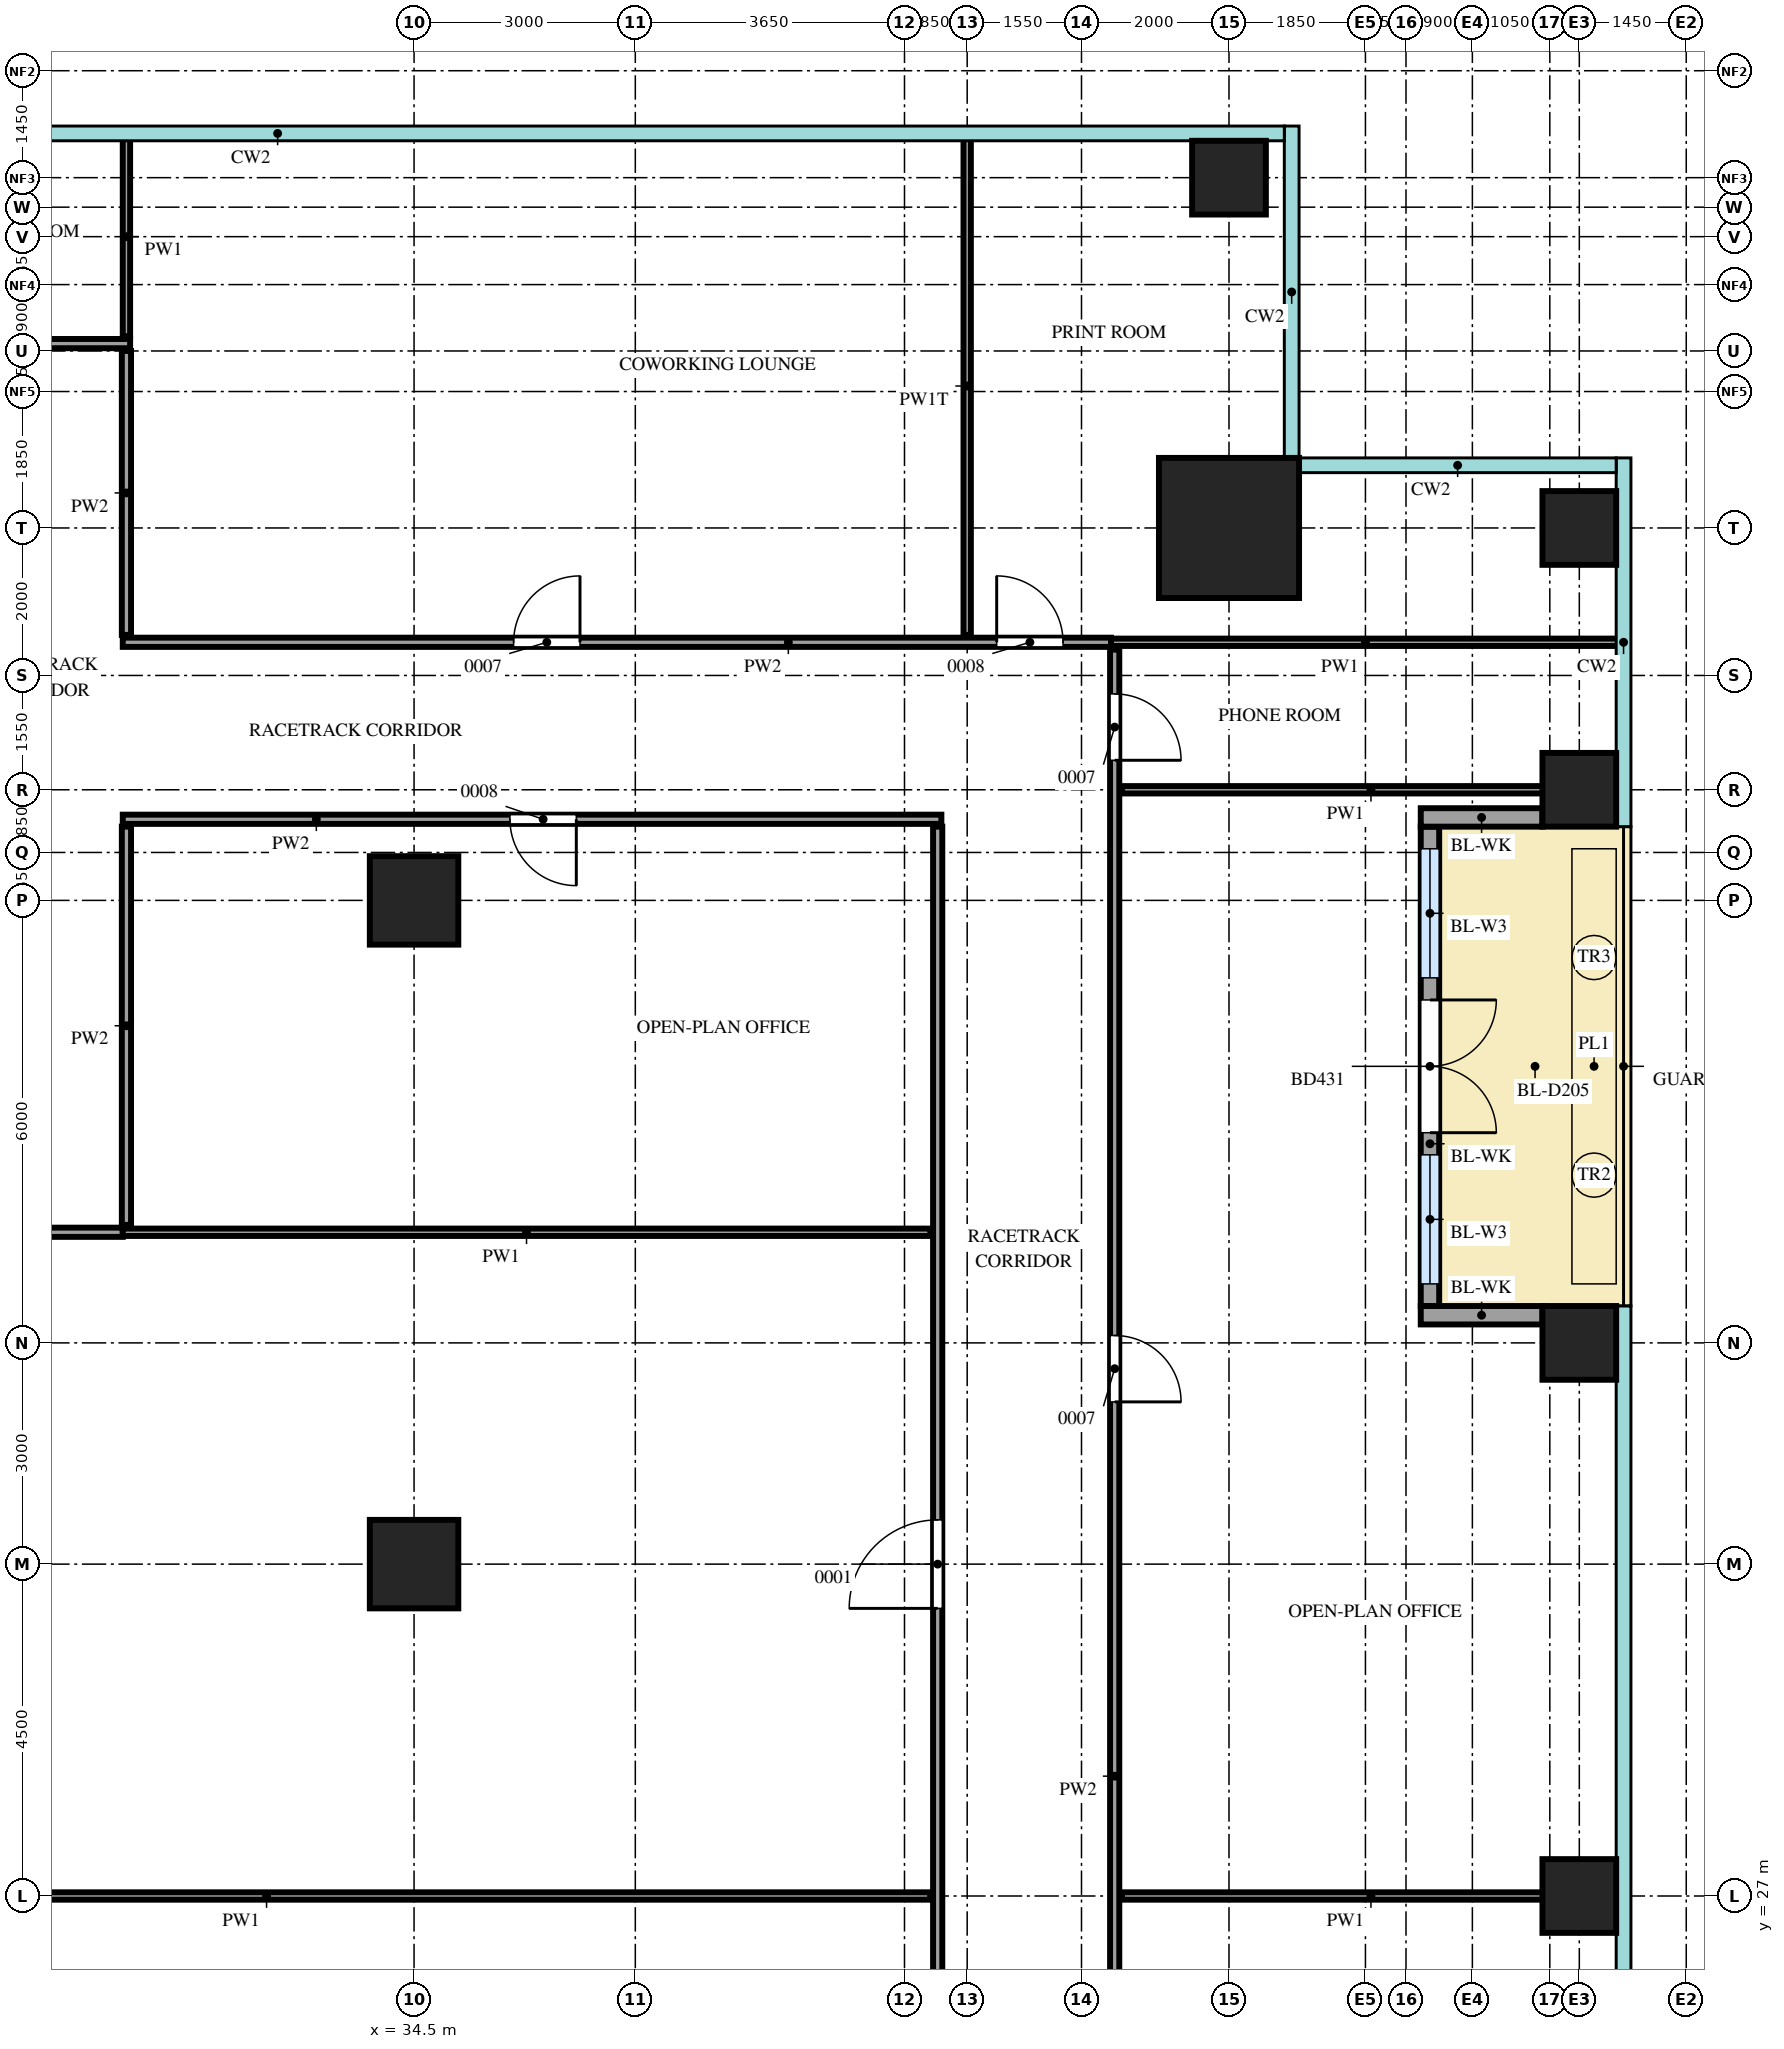
"""IFC4 building model, lengths in metres.
Left out: names, types, materials, properties, quantities, classifications, styles, units other than length and angle.
Written with IfcOpenShell. Run it as: python <this file> out.ifc"""

import sys

from ifc_helpers import new_model, si_unit, direction, frame, frame_2d, origin, origin_2d, place, context, subcontext, project, spatial, rectangle, extrude, source, transform, mapped, element, fill, save


model = new_model("IFC4")
c1 = context("Model", 3, precision=1e-05, world=origin(), true_north=direction((0.0, 1.0)))
c2 = subcontext(c1, "Body", "Model", "MODEL_VIEW")
j1 = project(units=[si_unit("LENGTHUNIT", "METRE"), si_unit("PLANEANGLEUNIT", "RADIAN")], contexts=[c1])
p1 = place(None, origin())
s1 = spatial("IfcSite", under=j1, at=p1, CompositionType="ELEMENT")
p2 = place(p1, origin())
s2 = spatial("IfcBuilding", under=s1, at=p2, CompositionType="ELEMENT")
p3 = place(p2, frame((0.0, 0.0, 196.7)))
s3 = spatial("IfcBuildingStorey", under=s2, at=p3, CompositionType="ELEMENT", Elevation=196.7)
m1 = source(origin(), c2, "Body", "SweptSolid", [
    extrude(rectangle(XDim=1.9, YDim=1.9, at=origin_2d()), origin(), (0.0, 0.0, 1.0), 4.0),
])
p4 = place(p3, frame((45.55, 45.55, 0.0), z_axis=(0.0, 0.0, 1.0), x_axis=(1.0, 0.0, 0.0)))
e1 = element("IfcColumn", 1, at=p4, inside=s3, PredefinedType="COLUMN", context=c2, shape_type="MappedRepresentation", body=[
    mapped(m1, transform((0.0, 0.0, 0.0))),
])
m2 = source(origin(), c2, "Body", "SweptSolid", [
    extrude(rectangle(XDim=1.0, YDim=1.0, at=origin_2d()), origin(), (0.0, 0.0, 1.0), 3.75),
])
for number, where, z_axis, x_axis in (
    (2, (50.3, 27.0, 0.0), (0.0, 0.0, 1.0), (1.0, 0.0, 0.0)),
    (3, (50.3, 34.5, 0.0), (0.0, 0.0, 1.0), (1.0, 0.0, 0.0)),
    (4, (50.3, 42.0, 0.0), (0.0, 0.0, 1.0), (1.0, 0.0, 0.0)),
    (5, (50.3, 45.55, 0.0), (0.0, 0.0, 1.0), (1.0, 0.0, 0.0)),
    (6, (45.55, 50.3, 0.0), (0.0, 0.0, 1.0), (1.0, 0.0, 0.0)),
):
    element("IfcColumn", number, at=place(p3, frame(where, z_axis=z_axis, x_axis=x_axis)), inside=s3, PredefinedType="COLUMN", context=c2, shape_type="MappedRepresentation", body=[
        mapped(m2, transform((0.0, 0.0, 0.0))),
    ])
m3 = source(origin(), c2, "Body", "SweptSolid", [
    extrude(rectangle(XDim=1.2, YDim=1.2, at=origin_2d()), origin(), (0.0, 0.0, 1.0), 3.75),
])
for number, where, z_axis, x_axis in (
    (7, (34.5, 31.5, 0.0), (0.0, 0.0, 1.0), (1.0, 0.0, 0.0)),
    (8, (34.5, 40.5, 0.0), (0.0, 0.0, 1.0), (1.0, 0.0, 0.0)),
):
    element("IfcColumn", number, at=place(p3, frame(where, z_axis=z_axis, x_axis=x_axis)), inside=s3, PredefinedType="COLUMN", context=c2, shape_type="MappedRepresentation", body=[
        mapped(m3, transform((0.0, 0.0, 0.0))),
    ])
m4 = source(origin(), c2, "Body", "SweptSolid", [
    extrude(rectangle(XDim=6.5, YDim=0.25, at=frame_2d((3.25, 0.0))), origin(), (0.0, 0.0, 1.0), 3.15),
])
p5 = place(p3, frame((48.275, 35.0, 0.0), z_axis=(0.0, 0.0, 1.0), x_axis=(0.0, 1.0, 0.0)))
e9 = element("IfcWall", 9, at=p5, inside=s3, PredefinedType="SOLIDWALL", context=c2, shape_type="MappedRepresentation", body=[
    mapped(m4, transform((0.0, 0.0, 0.0))),
])
m5 = source(origin(), c2, "Body", "SweptSolid", [
    extrude(rectangle(XDim=1.75, YDim=2.4, at=frame_2d((0.875, 1.2))), frame((0.0, 0.135, 0.0), z_axis=(0.0, -1.0, 0.0), x_axis=(1.0, 0.0, 0.0)), (0.0, 0.0, 1.0), 0.27),
])
p6 = place(p5, frame((0.3, 0.0, 0.0)))
e10 = element("IfcOpeningElement", 10, at=p6, cuts=e9, PredefinedType="OPENING", context=c2, shape_type="MappedRepresentation", body=[
    mapped(m5, transform((0.0, 0.0, 0.0))),
])
p7 = place(p5, frame((4.45, 0.0, 0.0)))
e11 = element("IfcOpeningElement", 11, at=p7, cuts=e9, PredefinedType="OPENING", context=c2, shape_type="MappedRepresentation", body=[
    mapped(m5, transform((0.0, 0.0, 0.0))),
])
m6 = source(origin(), c2, "Body", "SweptSolid", [
    extrude(rectangle(XDim=1.8, YDim=2.4, at=frame_2d((0.9, 1.2))), frame((0.0, 0.135, 0.0), z_axis=(0.0, -1.0, 0.0), x_axis=(1.0, 0.0, 0.0)), (0.0, 0.0, 1.0), 0.27),
])
p8 = place(p5, frame((2.35, 0.0, 0.0)))
e12 = element("IfcOpeningElement", 12, at=p8, cuts=e9, PredefinedType="OPENING", context=c2, shape_type="MappedRepresentation", body=[
    mapped(m6, transform((0.0, 0.0, 0.0))),
])
m7 = source(origin(), c2, "Body", "SweptSolid", [
    extrude(rectangle(XDim=1.65, YDim=0.25, at=frame_2d((0.825, 0.0))), origin(), (0.0, 0.0, 1.0), 3.15),
])
for number, where, z_axis, x_axis in (
    (13, (49.8, 34.875, 0.0), (0.0, 0.0, 1.0), (-1.0, 0.0, 0.0)),
    (14, (49.8, 41.625, 0.0), (0.0, 0.0, 1.0), (-1.0, 0.0, 0.0)),
):
    element("IfcWall", number, at=place(p3, frame(where, z_axis=z_axis, x_axis=x_axis)), inside=s3, PredefinedType="SOLIDWALL", context=c2, shape_type="MappedRepresentation", body=[
        mapped(m7, transform((0.0, 0.0, 0.0))),
    ])
m8 = source(origin(), c2, "Body", "SweptSolid", [
    extrude(rectangle(XDim=33.8, YDim=0.125, at=frame_2d((16.9, 0.0))), origin(), (0.0, 0.0, 1.0), 3.8),
])
p9 = place(p3, frame((44.0, 10.1, 0.0), z_axis=(0.0, 0.0, 1.0), x_axis=(0.0, 1.0, 0.0)))
e15 = element("IfcWall", 15, at=p9, inside=s3, PredefinedType="PARTITIONING", context=c2, shape_type="MappedRepresentation", body=[
    mapped(m8, transform((0.0, 0.0, 0.0))),
])
m9 = source(origin(), c2, "Body", "SweptSolid", [
    extrude(rectangle(XDim=0.9, YDim=2.1, at=frame_2d((0.45, 1.05))), frame((0.0, 0.073, 0.0), z_axis=(0.0, -1.0, 0.0), x_axis=(1.0, 0.0, 0.0)), (0.0, 0.0, 1.0), 0.145),
])
p10 = place(p9, frame((5.25, 0.0, 0.0)))
e16 = element("IfcOpeningElement", 16, at=p10, cuts=e15, PredefinedType="OPENING", context=c2, shape_type="MappedRepresentation", body=[
    mapped(m9, transform((0.0, 0.0, 0.0))),
])
p11 = place(p9, frame((12.55, 0.0, 0.0)))
e17 = element("IfcOpeningElement", 17, at=p11, cuts=e15, PredefinedType="OPENING", context=c2, shape_type="MappedRepresentation", body=[
    mapped(m9, transform((0.0, 0.0, 0.0))),
])
p12 = place(p9, frame((23.6, 0.0, 0.0)))
e18 = element("IfcOpeningElement", 18, at=p12, cuts=e15, PredefinedType="OPENING", context=c2, shape_type="MappedRepresentation", body=[
    mapped(m9, transform((0.0, 0.0, 0.0))),
])
p13 = place(p9, frame((32.3, 0.0, 0.0)))
e19 = element("IfcOpeningElement", 19, at=p13, cuts=e15, PredefinedType="OPENING", context=c2, shape_type="MappedRepresentation", body=[
    mapped(m9, transform((0.0, 0.0, 0.0))),
])
m10 = source(origin(), c2, "Body", "SweptSolid", [
    extrude(rectangle(XDim=29.0, YDim=0.125, at=frame_2d((14.5, 0.0))), origin(), (0.0, 0.0, 1.0), 3.8),
])
p14 = place(p3, frame((41.6, 12.5, 0.0), z_axis=(0.0, 0.0, 1.0), x_axis=(0.0, 1.0, 0.0)))
e20 = element("IfcWall", 20, at=p14, inside=s3, PredefinedType="PARTITIONING", context=c2, shape_type="MappedRepresentation", body=[
    mapped(m10, transform((0.0, 0.0, 0.0))),
])
m11 = source(origin(), c2, "Body", "SweptSolid", [
    extrude(rectangle(XDim=1.2, YDim=2.1, at=frame_2d((0.6, 1.05))), frame((0.0, 0.073, 0.0), z_axis=(0.0, -1.0, 0.0), x_axis=(1.0, 0.0, 0.0)), (0.0, 0.0, 1.0), 0.145),
])
p15 = place(p14, frame((18.4, 0.0, 0.0)))
e21 = element("IfcOpeningElement", 21, at=p15, cuts=e20, PredefinedType="OPENING", context=c2, shape_type="MappedRepresentation", body=[
    mapped(m11, transform((0.0, 0.0, 0.0))),
])
m12 = source(origin(), c2, "Body", "SweptSolid", [
    extrude(rectangle(XDim=18.0, YDim=0.1, at=frame_2d((9.0, 0.0))), origin(), (0.0, 0.0, 1.0), 3.8),
])
p16 = place(p3, frame((23.5, 27.0, 0.0), z_axis=(0.0, 0.0, 1.0), x_axis=(1.0, 0.0, 0.0)))
e22 = element("IfcWall", 22, at=p16, inside=s3, PredefinedType="PARTITIONING", context=c2, shape_type="MappedRepresentation", body=[
    mapped(m12, transform((0.0, 0.0, 0.0))),
])
m13 = source(origin(), c2, "Body", "SweptSolid", [
    extrude(rectangle(XDim=6.75, YDim=0.1, at=frame_2d((3.375, 0.0))), origin(), (0.0, 0.0, 1.0), 3.8),
])
p17 = place(p3, frame((44.1, 27.0, 0.0), z_axis=(0.0, 0.0, 1.0), x_axis=(1.0, 0.0, 0.0)))
e23 = element("IfcWall", 23, at=p17, inside=s3, PredefinedType="PARTITIONING", context=c2, shape_type="MappedRepresentation", body=[
    mapped(m13, transform((0.0, 0.0, 0.0))),
])
m14 = source(origin(), c2, "Body", "SweptSolid", [
    extrude(rectangle(XDim=7.2, YDim=0.125, at=frame_2d((3.6, 0.0))), origin(), (0.0, 0.0, 1.0), 3.8),
])
p18 = place(p3, frame((23.35, 36.0, 0.0), z_axis=(0.0, 0.0, 1.0), x_axis=(1.0, 0.0, 0.0)))
e24 = element("IfcWall", 24, at=p18, inside=s3, PredefinedType="PARTITIONING", context=c2, shape_type="MappedRepresentation", body=[
    mapped(m14, transform((0.0, 0.0, 0.0))),
])
m15 = source(origin(), c2, "Body", "SweptSolid", [
    extrude(rectangle(XDim=10.95, YDim=0.1, at=frame_2d((5.475, 0.0))), origin(), (0.0, 0.0, 1.0), 3.8),
])
p19 = place(p3, frame((30.55, 36.0, 0.0), z_axis=(0.0, 0.0, 1.0), x_axis=(1.0, 0.0, 0.0)))
e25 = element("IfcWall", 25, at=p19, inside=s3, PredefinedType="PARTITIONING", context=c2, shape_type="MappedRepresentation", body=[
    mapped(m15, transform((0.0, 0.0, 0.0))),
])
m16 = source(origin(), c2, "Body", "SweptSolid", [
    extrude(rectangle(XDim=5.4, YDim=0.125, at=frame_2d((2.7, 0.0))), origin(), (0.0, 0.0, 1.0), 3.8),
])
p20 = place(p3, frame((30.6, 36.1, 0.0), z_axis=(0.0, 0.0, 1.0), x_axis=(0.0, 1.0, 0.0)))
e26 = element("IfcWall", 26, at=p20, inside=s3, PredefinedType="PARTITIONING", context=c2, shape_type="MappedRepresentation", body=[
    mapped(m16, transform((0.0, 0.0, 0.0))),
])
m17 = source(origin(), c2, "Body", "SweptSolid", [
    extrude(rectangle(XDim=11.1, YDim=0.125, at=frame_2d((5.55, 0.0))), origin(), (0.0, 0.0, 1.0), 3.8),
])
p21 = place(p3, frame((30.55, 41.6, 0.0), z_axis=(0.0, 0.0, 1.0), x_axis=(1.0, 0.0, 0.0)))
e27 = element("IfcWall", 27, at=p21, inside=s3, PredefinedType="PARTITIONING", context=c2, shape_type="MappedRepresentation", body=[
    mapped(m17, transform((0.0, 0.0, 0.0))),
])
p22 = place(p21, frame((5.25, 0.0, 0.0)))
e28 = element("IfcOpeningElement", 28, at=p22, cuts=e27, PredefinedType="OPENING", context=c2, shape_type="MappedRepresentation", body=[
    mapped(m9, transform((0.0, 0.0, 0.0))),
])
p23 = place(p3, frame((44.1, 42.0, 0.0), z_axis=(0.0, 0.0, 1.0), x_axis=(1.0, 0.0, 0.0)))
e29 = element("IfcWall", 29, at=p23, inside=s3, PredefinedType="PARTITIONING", context=c2, shape_type="MappedRepresentation", body=[
    mapped(m13, transform((0.0, 0.0, 0.0))),
])
m18 = source(origin(), c2, "Body", "SweptSolid", [
    extrude(rectangle(XDim=13.4, YDim=0.125, at=frame_2d((6.7, 0.0))), origin(), (0.0, 0.0, 1.0), 3.8),
])
p24 = place(p3, frame((30.55, 44.0, 0.0), z_axis=(0.0, 0.0, 1.0), x_axis=(1.0, 0.0, 0.0)))
e30 = element("IfcWall", 30, at=p24, inside=s3, PredefinedType="PARTITIONING", context=c2, shape_type="MappedRepresentation", body=[
    mapped(m18, transform((0.0, 0.0, 0.0))),
])
p25 = place(p24, frame((5.3, 0.0, 0.0)))
e31 = element("IfcOpeningElement", 31, at=p25, cuts=e30, PredefinedType="OPENING", context=c2, shape_type="MappedRepresentation", body=[
    mapped(m9, transform((0.0, 0.0, 0.0))),
])
p26 = place(p24, frame((11.85, 0.0, 0.0)))
e32 = element("IfcOpeningElement", 32, at=p26, cuts=e30, PredefinedType="OPENING", context=c2, shape_type="MappedRepresentation", body=[
    mapped(m9, transform((0.0, 0.0, 0.0))),
])
m19 = source(origin(), c2, "Body", "SweptSolid", [
    extrude(rectangle(XDim=6.9, YDim=0.1, at=frame_2d((3.45, 0.0))), origin(), (0.0, 0.0, 1.0), 3.8),
])
p27 = place(p3, frame((43.95, 44.0, 0.0), z_axis=(0.0, 0.0, 1.0), x_axis=(1.0, 0.0, 0.0)))
e33 = element("IfcWall", 33, at=p27, inside=s3, PredefinedType="PARTITIONING", context=c2, shape_type="MappedRepresentation", body=[
    mapped(m19, transform((0.0, 0.0, 0.0))),
])
m20 = source(origin(), c2, "Body", "SweptSolid", [
    extrude(rectangle(XDim=3.85, YDim=0.125, at=frame_2d((1.925, 0.0))), origin(), (0.0, 0.0, 1.0), 3.8),
])
p28 = place(p3, frame((30.6, 44.1, 0.0), z_axis=(0.0, 0.0, 1.0), x_axis=(0.0, 1.0, 0.0)))
e34 = element("IfcWall", 34, at=p28, inside=s3, PredefinedType="PARTITIONING", context=c2, shape_type="MappedRepresentation", body=[
    mapped(m20, transform((0.0, 0.0, 0.0))),
])
m21 = source(origin(), c2, "Body", "SweptSolid", [
    extrude(rectangle(XDim=6.75, YDim=0.1, at=frame_2d((3.375, 0.0))), origin(), (0.0, 0.0, 1.0), 3.3),
])
p29 = place(p3, frame((42.0, 44.1, 0.0), z_axis=(0.0, 0.0, 1.0), x_axis=(0.0, 1.0, 0.0)))
e35 = element("IfcWall", 35, at=p29, inside=s3, PredefinedType="PARTITIONING", context=c2, shape_type="MappedRepresentation", body=[
    mapped(m21, transform((0.0, 0.0, 0.0))),
])
m22 = source(origin(), c2, "Body", "SweptSolid", [
    extrude(rectangle(XDim=2.7, YDim=0.1, at=frame_2d((1.35, 0.0))), origin(), (0.0, 0.0, 1.0), 3.8),
])
p30 = place(p3, frame((30.6, 48.15, 0.0), z_axis=(0.0, 0.0, 1.0), x_axis=(0.0, 1.0, 0.0)))
e36 = element("IfcWall", 36, at=p30, inside=s3, PredefinedType="PARTITIONING", context=c2, shape_type="MappedRepresentation", body=[
    mapped(m22, transform((0.0, 0.0, 0.0))),
])
m23 = source(origin(), c2, "Body", "SweptSolid", [
    extrude(rectangle(XDim=13.9, YDim=0.125, at=frame_2d((6.95, 0.0))), origin(), (0.0, 0.0, 1.0), 3.8),
])
p31 = place(p3, frame((16.75, 48.05, 0.0), z_axis=(0.0, 0.0, 1.0), x_axis=(1.0, 0.0, 0.0)))
e37 = element("IfcWall", 37, at=p31, inside=s3, PredefinedType="PARTITIONING", context=c2, shape_type="MappedRepresentation", body=[
    mapped(m23, transform((0.0, 0.0, 0.0))),
])
p32 = place(p31, frame((7.7, 0.0, 0.0)))
e38 = element("IfcOpeningElement", 38, at=p32, cuts=e37, PredefinedType="OPENING", context=c2, shape_type="MappedRepresentation", body=[
    mapped(m9, transform((0.0, 0.0, 0.0))),
])
m24 = source(origin(), c2, "Body", "SweptSolid", [
    extrude(rectangle(XDim=1.75, YDim=2.4, at=frame_2d((0.875, 1.2))), frame((0.0, 0.03, 0.0), z_axis=(0.0, -1.0, 0.0), x_axis=(1.0, 0.0, 0.0)), (0.0, 0.0, 1.0), 0.06),
])
p33 = place(p6, origin())
e39 = element("IfcWindow", 39, at=p33, inside=s3, PartitioningType="SINGLE_PANEL", PredefinedType="WINDOW", context=c2, shape_type="MappedRepresentation", body=[
    mapped(m24, transform((0.0, 0.0, 0.0))),
])
fill(e10, e39)
p34 = place(p7, origin())
e40 = element("IfcWindow", 40, at=p34, inside=s3, PartitioningType="SINGLE_PANEL", PredefinedType="WINDOW", context=c2, shape_type="MappedRepresentation", body=[
    mapped(m24, transform((0.0, 0.0, 0.0))),
])
fill(e11, e40)
m25 = source(origin(), c2, "Body", "SweptSolid", [
    extrude(rectangle(XDim=1.8, YDim=2.4, at=frame_2d((0.9, 1.2))), frame((0.0, 0.025, 0.0), z_axis=(0.0, -1.0, 0.0), x_axis=(1.0, 0.0, 0.0)), (0.0, 0.0, 1.0), 0.05),
])
p35 = place(p8, origin())
e41 = element("IfcDoor", 41, at=p35, inside=s3, OperationType="DOUBLE_DOOR_DOUBLE_SWING", PredefinedType="DOOR", context=c2, shape_type="MappedRepresentation", body=[
    mapped(m25, transform((0.0, 0.0, 0.0))),
])
fill(e12, e41)
m26 = source(origin(), c2, "Body", "SweptSolid", [
    extrude(rectangle(XDim=0.9, YDim=2.1, at=frame_2d((0.45, 1.05))), frame((0.0, 0.025, 0.0), z_axis=(0.0, -1.0, 0.0), x_axis=(1.0, 0.0, 0.0)), (0.0, 0.0, 1.0), 0.05),
])
p36 = place(p12, origin())
e42 = element("IfcDoor", 42, at=p36, inside=s3, OperationType="SINGLE_SWING_LEFT", PredefinedType="DOOR", context=c2, shape_type="MappedRepresentation", body=[
    mapped(m26, transform((0.0, 0.0, 0.0))),
])
fill(e18, e42)
p37 = place(p13, origin())
e43 = element("IfcDoor", 43, at=p37, inside=s3, OperationType="SINGLE_SWING_LEFT", PredefinedType="DOOR", context=c2, shape_type="MappedRepresentation", body=[
    mapped(m26, transform((0.0, 0.0, 0.0))),
])
fill(e19, e43)
p38 = place(p25, origin())
e44 = element("IfcDoor", 44, at=p38, inside=s3, OperationType="SINGLE_SWING_LEFT", PredefinedType="DOOR", context=c2, shape_type="MappedRepresentation", body=[
    mapped(m26, transform((0.0, 0.0, 0.0))),
])
fill(e31, e44)
p39 = place(p26, origin())
e45 = element("IfcDoor", 45, at=p39, inside=s3, OperationType="SINGLE_SWING_RIGHT", PredefinedType="DOOR", context=c2, shape_type="MappedRepresentation", body=[
    mapped(m26, transform((0.0, 0.0, 0.0))),
])
fill(e32, e45)
m27 = source(origin(), c2, "Body", "SweptSolid", [
    extrude(rectangle(XDim=1.2, YDim=2.1, at=frame_2d((0.6, 1.05))), frame((0.0, 0.025, 0.0), z_axis=(0.0, -1.0, 0.0), x_axis=(1.0, 0.0, 0.0)), (0.0, 0.0, 1.0), 0.05),
])
p40 = place(p15, origin())
e46 = element("IfcDoor", 46, at=p40, inside=s3, OperationType="SINGLE_SWING_RIGHT", PredefinedType="DOOR", context=c2, shape_type="MappedRepresentation", body=[
    mapped(m27, transform((0.0, 0.0, 0.0))),
])
fill(e21, e46)
p41 = place(p22, origin())
e47 = element("IfcDoor", 47, at=p41, inside=s3, OperationType="SINGLE_SWING_RIGHT", PredefinedType="DOOR", context=c2, shape_type="MappedRepresentation", body=[
    mapped(m26, transform((0.0, 0.0, 0.0))),
])
fill(e28, e47)
save(model, sys.argv[1])
